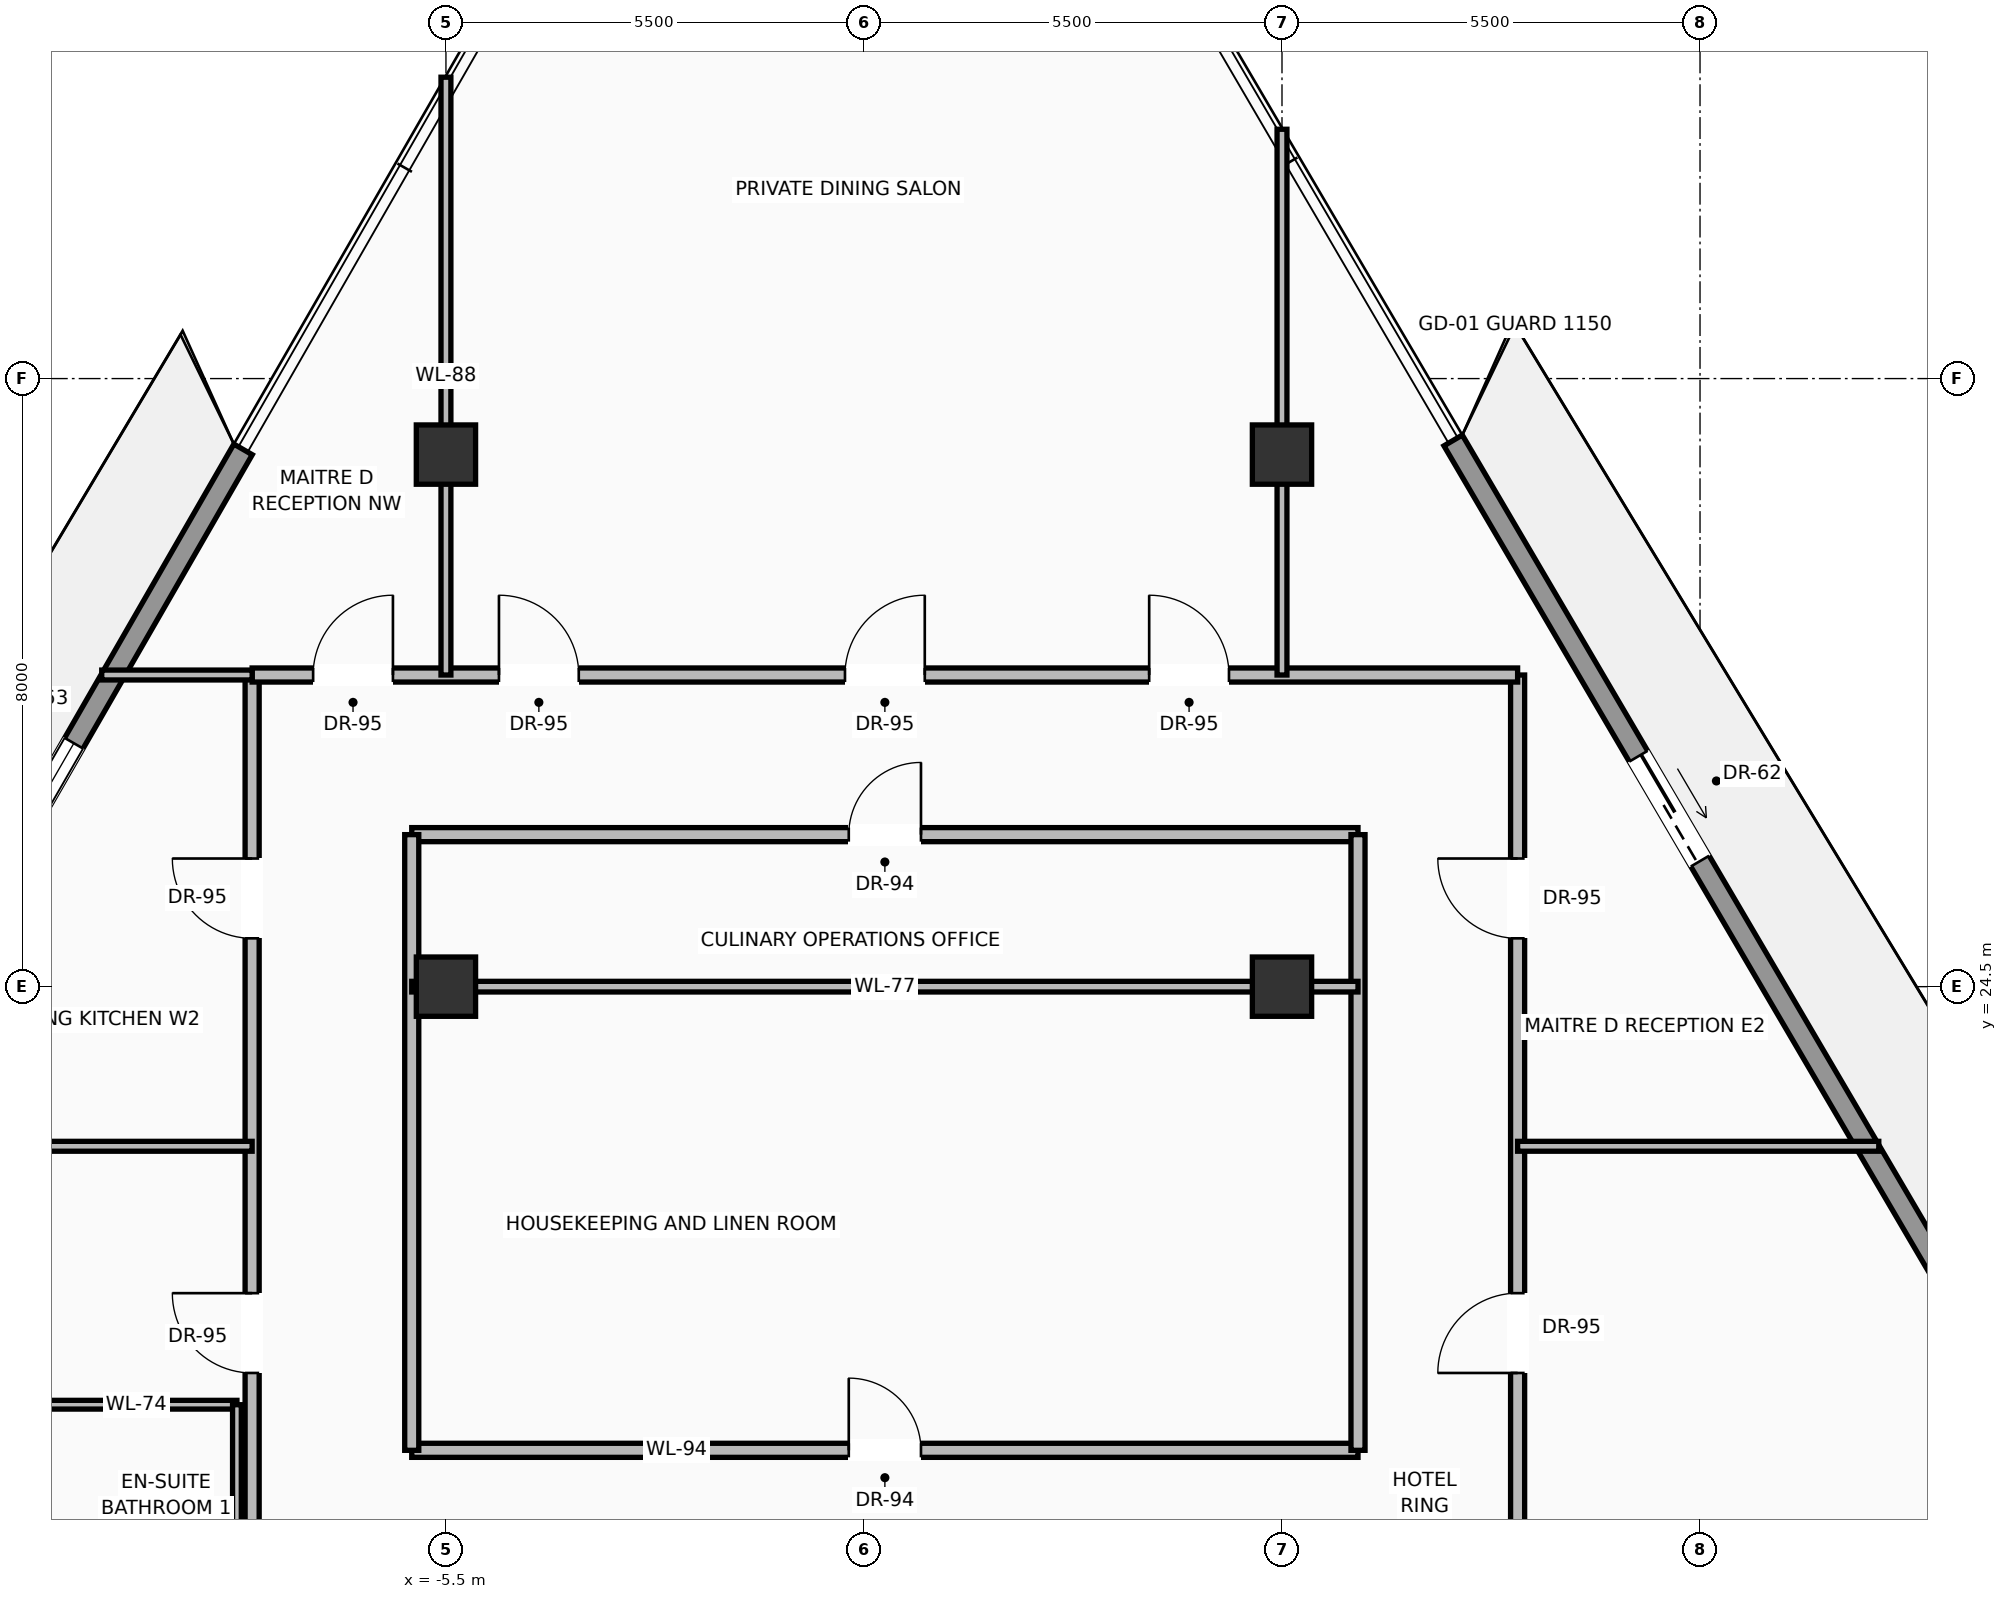
"""IFC4 building model, lengths in metres.
Left out: names, types, materials, properties, quantities, classifications, styles, units other than length and angle.
Written with IfcOpenShell. Run it as: python <this file> out.ifc"""

import sys

from ifc_helpers import new_model, si_unit, direction, frame, frame_2d, origin, origin_2d, place, context, subcontext, project, spatial, rectangle, extrude, source, transform, mapped, element, fill, save


model = new_model("IFC4")
c1 = context("Model", 3, precision=1e-05, world=origin(), true_north=direction((0.0, 1.0)))
c2 = subcontext(c1, "Body", "Model", "MODEL_VIEW")
j1 = project(units=[si_unit("LENGTHUNIT", "METRE"), si_unit("PLANEANGLEUNIT", "RADIAN")], contexts=[c1])
p1 = place(None, origin())
s1 = spatial("IfcSite", under=j1, at=p1, CompositionType="ELEMENT")
p2 = place(p1, origin())
s2 = spatial("IfcBuilding", under=s1, at=p2, CompositionType="ELEMENT")
p3 = place(p2, frame((0.0, 0.0, 283.35)))
s3 = spatial("IfcBuildingStorey", under=s2, at=p3, CompositionType="ELEMENT", Elevation=283.35)
m1 = source(origin(), c2, "Body", "SweptSolid", [
    extrude(rectangle(XDim=0.78, YDim=0.78, at=origin_2d()), origin(), (0.0, 0.0, 1.0), 3.45),
])
for number, where, z_axis, x_axis in (
    (1, (-5.5, 24.5, 0.0), (0.0, 0.0, 1.0), (1.0, 0.0, 0.0)),
    (2, (5.5, 24.5, 0.0), (0.0, 0.0, 1.0), (1.0, 0.0, 0.0)),
    (3, (-5.5, 31.5, 0.0), (0.0, 0.0, 1.0), (1.0, 0.0, 0.0)),
    (4, (5.5, 31.5, 0.0), (0.0, 0.0, 1.0), (1.0, 0.0, 0.0)),
):
    element("IfcColumn", number, at=place(p3, frame(where, z_axis=z_axis, x_axis=x_axis)), inside=s3, PredefinedType="COLUMN", context=c2, shape_type="MappedRepresentation", body=[
        mapped(m1, transform((0.0, 0.0, 0.0), scale=1.0)),
    ])
p4 = place(p3, frame((-18.245, 14.072, 0.0), z_axis=(0.0, 0.0, 1.0), x_axis=(0.499006273731, 0.866598372244, 0.0)))
e5 = element("IfcWall", 5, at=p4, inside=s3, PredefinedType="SOLIDWALL", context=c2, shape_type="SweptSolid", body=[
    extrude(rectangle(XDim=20.19, YDim=0.28, at=frame_2d((10.095, 0.0))), origin(), (0.0, 0.0, 1.0), 2.82),
])
p5 = place(p4, frame((4.846, 0.0, 0.0)))
e6 = element("IfcOpeningElement", 6, at=p5, cuts=e5, PredefinedType="OPENING", context=c2, shape_type="SweptSolid", body=[
    extrude(rectangle(XDim=1.6, YDim=2.35, at=frame_2d((0.8, 1.175))), frame((0.0, 0.15, 0.0), z_axis=(0.0, -1.0, 0.0), x_axis=(1.0, 0.0, 0.0)), (0.0, 0.0, 1.0), 0.3),
])
p6 = place(p4, frame((13.729, 0.0, 0.9)))
e7 = element("IfcOpeningElement", 7, at=p6, cuts=e5, PredefinedType="OPENING", context=c2, shape_type="SweptSolid", body=[
    extrude(rectangle(XDim=2.0, YDim=1.75, at=frame_2d((1.0, 0.875))), frame((0.0, 0.15, 0.0), z_axis=(0.0, -1.0, 0.0), x_axis=(1.0, 0.0, 0.0)), (0.0, 0.0, 1.0), 0.3),
])
p7 = place(p3, frame((7.752, 31.686, 0.0), z_axis=(0.0, 0.0, 1.0), x_axis=(0.506132125438, -0.862455953426, 0.0)))
e8 = element("IfcWall", 8, at=p7, inside=s3, PredefinedType="SOLIDWALL", context=c2, shape_type="SweptSolid", body=[
    extrude(rectangle(XDim=20.071, YDim=0.28, at=frame_2d((10.036, 0.0))), origin(), (0.0, 0.0, 1.0), 2.82),
])
p8 = place(p7, frame((4.817, 0.0, 0.0)))
e9 = element("IfcOpeningElement", 9, at=p8, cuts=e8, PredefinedType="OPENING", context=c2, shape_type="SweptSolid", body=[
    extrude(rectangle(XDim=1.6, YDim=2.35, at=frame_2d((0.8, 1.175))), frame((0.0, 0.15, 0.0), z_axis=(0.0, -1.0, 0.0), x_axis=(1.0, 0.0, 0.0)), (0.0, 0.0, 1.0), 0.3),
])
p9 = place(p7, frame((13.648, 0.0, 0.9)))
e10 = element("IfcOpeningElement", 10, at=p9, cuts=e8, PredefinedType="OPENING", context=c2, shape_type="SweptSolid", body=[
    extrude(rectangle(XDim=2.0, YDim=1.75, at=frame_2d((1.0, 0.875))), frame((0.0, 0.15, 0.0), z_axis=(0.0, -1.0, 0.0), x_axis=(1.0, 0.0, 0.0)), (0.0, 0.0, 1.0), 0.3),
])
p10 = place(p3, frame((-5.95, 18.4, 0.0), z_axis=(0.0, 0.0, 1.0), x_axis=(1.0, 0.0, 0.0)))
e11 = element("IfcWall", 11, at=p10, inside=s3, PredefinedType="PARTITIONING", context=c2, shape_type="SweptSolid", body=[
    extrude(rectangle(XDim=12.45, YDim=0.185, at=frame_2d((6.225, 0.0))), origin(), (0.0, 0.0, 1.0), 3.232),
])
p11 = place(p10, frame((5.75, 0.0, 0.0)))
e12 = element("IfcOpeningElement", 12, at=p11, cuts=e11, PredefinedType="OPENING", context=c2, shape_type="SweptSolid", body=[
    extrude(rectangle(XDim=0.95, YDim=2.2, at=frame_2d((0.475, 1.1))), frame((0.0, 0.103, 0.0), z_axis=(0.0, -1.0, 0.0), x_axis=(1.0, 0.0, 0.0)), (0.0, 0.0, 1.0), 0.205),
])
p12 = place(p3, frame((-5.95, 26.5, 0.0), z_axis=(0.0, 0.0, 1.0), x_axis=(1.0, 0.0, 0.0)))
e13 = element("IfcWall", 13, at=p12, inside=s3, PredefinedType="PARTITIONING", context=c2, shape_type="SweptSolid", body=[
    extrude(rectangle(XDim=12.45, YDim=0.185, at=frame_2d((6.225, 0.0))), origin(), (0.0, 0.0, 1.0), 3.232),
])
p13 = place(p12, frame((5.75, 0.0, 0.0)))
e14 = element("IfcOpeningElement", 14, at=p13, cuts=e13, PredefinedType="OPENING", context=c2, shape_type="SweptSolid", body=[
    extrude(rectangle(XDim=0.95, YDim=2.2, at=frame_2d((0.475, 1.1))), frame((0.0, 0.103, 0.0), z_axis=(0.0, -1.0, 0.0), x_axis=(1.0, 0.0, 0.0)), (0.0, 0.0, 1.0), 0.205),
])
for number, where, z_axis, x_axis in (
    (15, (-5.95, 18.4, 0.0), (0.0, 0.0, 1.0), (0.0, 1.0, 0.0)),
    (16, (6.5, 18.4, 0.0), (0.0, 0.0, 1.0), (0.0, 1.0, 0.0)),
):
    element("IfcWall", number, at=place(p3, frame(where, z_axis=z_axis, x_axis=x_axis)), inside=s3, PredefinedType="PARTITIONING", context=c2, shape_type="SweptSolid", body=[
        extrude(rectangle(XDim=8.1, YDim=0.185, at=frame_2d((4.05, 0.0))), origin(), (0.0, 0.0, 1.0), 3.232),
    ])
p14 = place(p3, frame((-8.05, 16.2, 0.0), z_axis=(0.0, 0.0, 1.0), x_axis=(0.0, 1.0, 0.0)))
e17 = element("IfcWall", 17, at=p14, inside=s3, PredefinedType="PARTITIONING", context=c2, shape_type="SweptSolid", body=[
    extrude(rectangle(XDim=12.4, YDim=0.185, at=frame_2d((6.2, 0.0))), origin(), (0.0, 0.0, 1.0), 3.232),
])
p15 = place(p14, frame((3.218, 0.0, 0.0)))
e18 = element("IfcOpeningElement", 18, at=p15, cuts=e17, PredefinedType="OPENING", context=c2, shape_type="SweptSolid", body=[
    extrude(rectangle(XDim=1.05, YDim=2.25, at=frame_2d((0.525, 1.125))), frame((0.0, 0.103, 0.0), z_axis=(0.0, -1.0, 0.0), x_axis=(1.0, 0.0, 0.0)), (0.0, 0.0, 1.0), 0.205),
])
p16 = place(p14, frame((8.936, 0.0, 0.0)))
e19 = element("IfcOpeningElement", 19, at=p16, cuts=e17, PredefinedType="OPENING", context=c2, shape_type="SweptSolid", body=[
    extrude(rectangle(XDim=1.05, YDim=2.25, at=frame_2d((0.525, 1.125))), frame((0.0, 0.103, 0.0), z_axis=(0.0, -1.0, 0.0), x_axis=(1.0, 0.0, 0.0)), (0.0, 0.0, 1.0), 0.205),
])
p17 = place(p3, frame((8.6, 16.2, 0.0), z_axis=(0.0, 0.0, 1.0), x_axis=(0.0, 1.0, 0.0)))
e20 = element("IfcWall", 20, at=p17, inside=s3, PredefinedType="PARTITIONING", context=c2, shape_type="SweptSolid", body=[
    extrude(rectangle(XDim=12.4, YDim=0.185, at=frame_2d((6.2, 0.0))), origin(), (0.0, 0.0, 1.0), 3.232),
])
p18 = place(p17, frame((3.218, 0.0, 0.0)))
e21 = element("IfcOpeningElement", 21, at=p18, cuts=e20, PredefinedType="OPENING", context=c2, shape_type="SweptSolid", body=[
    extrude(rectangle(XDim=1.05, YDim=2.25, at=frame_2d((0.525, 1.125))), frame((0.0, 0.103, 0.0), z_axis=(0.0, -1.0, 0.0), x_axis=(1.0, 0.0, 0.0)), (0.0, 0.0, 1.0), 0.205),
])
p19 = place(p17, frame((8.936, 0.0, 0.0)))
e22 = element("IfcOpeningElement", 22, at=p19, cuts=e20, PredefinedType="OPENING", context=c2, shape_type="SweptSolid", body=[
    extrude(rectangle(XDim=1.05, YDim=2.25, at=frame_2d((0.525, 1.125))), frame((0.0, 0.103, 0.0), z_axis=(0.0, -1.0, 0.0), x_axis=(1.0, 0.0, 0.0)), (0.0, 0.0, 1.0), 0.205),
])
p20 = place(p3, frame((-8.05, 28.6, 0.0), z_axis=(0.0, 0.0, 1.0), x_axis=(1.0, 0.0, 0.0)))
e23 = element("IfcWall", 23, at=p20, inside=s3, PredefinedType="PARTITIONING", context=c2, shape_type="SweptSolid", body=[
    extrude(rectangle(XDim=16.65, YDim=0.185, at=frame_2d((8.325, 0.0))), origin(), (0.0, 0.0, 1.0), 3.232),
])
p21 = place(p20, frame((3.248, 0.0, 0.0)))
e24 = element("IfcOpeningElement", 24, at=p21, cuts=e23, PredefinedType="OPENING", context=c2, shape_type="SweptSolid", body=[
    extrude(rectangle(XDim=1.05, YDim=2.25, at=frame_2d((0.525, 1.125))), frame((0.0, 0.103, 0.0), z_axis=(0.0, -1.0, 0.0), x_axis=(1.0, 0.0, 0.0)), (0.0, 0.0, 1.0), 0.205),
])
p22 = place(p20, frame((7.8, 0.0, 0.0)))
e25 = element("IfcOpeningElement", 25, at=p22, cuts=e23, PredefinedType="OPENING", context=c2, shape_type="SweptSolid", body=[
    extrude(rectangle(XDim=1.05, YDim=2.25, at=frame_2d((0.525, 1.125))), frame((0.0, 0.103, 0.0), z_axis=(0.0, -1.0, 0.0), x_axis=(1.0, 0.0, 0.0)), (0.0, 0.0, 1.0), 0.205),
])
p23 = place(p20, frame((11.802, 0.0, 0.0)))
e26 = element("IfcOpeningElement", 26, at=p23, cuts=e23, PredefinedType="OPENING", context=c2, shape_type="SweptSolid", body=[
    extrude(rectangle(XDim=1.05, YDim=2.25, at=frame_2d((0.525, 1.125))), frame((0.0, 0.103, 0.0), z_axis=(0.0, -1.0, 0.0), x_axis=(1.0, 0.0, 0.0)), (0.0, 0.0, 1.0), 0.205),
])
p24 = place(p20, frame((0.802, 0.0, 0.0)))
e27 = element("IfcOpeningElement", 27, at=p24, cuts=e23, PredefinedType="OPENING", context=c2, shape_type="SweptSolid", body=[
    extrude(rectangle(XDim=1.05, YDim=2.25, at=frame_2d((0.525, 1.125))), frame((0.0, 0.103, 0.0), z_axis=(0.0, -1.0, 0.0), x_axis=(1.0, 0.0, 0.0)), (0.0, 0.0, 1.0), 0.205),
])
p25 = place(p3, frame((-5.95, 24.5, 0.0), z_axis=(0.0, 0.0, 1.0), x_axis=(1.0, 0.0, 0.0)))
e28 = element("IfcWall", 28, at=p25, inside=s3, PredefinedType="PARTITIONING", context=c2, shape_type="SweptSolid", body=[
    extrude(rectangle(XDim=12.45, YDim=0.14, at=frame_2d((6.225, 0.0))), origin(), (0.0, 0.0, 1.0), 2.683),
])
p26 = place(p3, frame((-10.029, 28.6, 0.0), z_axis=(0.0, 0.0, 1.0), x_axis=(1.0, 0.0, 0.0)))
e29 = element("IfcWall", 29, at=p26, inside=s3, PredefinedType="PARTITIONING", context=c2, shape_type="SweptSolid", body=[
    extrude(rectangle(XDim=1.979, YDim=0.13, at=frame_2d((0.989, 0.0))), origin(), (0.0, 0.0, 1.0), 3.232),
])
p27 = place(p3, frame((-5.5, 28.6, 0.0), z_axis=(0.0, 0.0, 1.0), x_axis=(0.0, 1.0, 0.0)))
e30 = element("IfcWall", 30, at=p27, inside=s3, PredefinedType="PARTITIONING", context=c2, shape_type="SweptSolid", body=[
    extrude(rectangle(XDim=7.865, YDim=0.13, at=frame_2d((3.932, 0.0))), origin(), (0.0, 0.0, 1.0), 2.683),
])
p28 = place(p3, frame((5.5, 28.6, 0.0), z_axis=(0.0, 0.0, 1.0), x_axis=(0.0, 1.0, 0.0)))
e31 = element("IfcWall", 31, at=p28, inside=s3, PredefinedType="PARTITIONING", context=c2, shape_type="SweptSolid", body=[
    extrude(rectangle(XDim=7.18, YDim=0.13, at=frame_2d((3.59, 0.0))), origin(), (0.0, 0.0, 1.0), 2.683),
])
p29 = place(p3, frame((-10.9, 19.0, 0.0), z_axis=(0.0, 0.0, 1.0), x_axis=(1.0, 0.0, 0.0)))
e32 = element("IfcWall", 32, at=p29, inside=s3, PredefinedType="PARTITIONING", context=c2, shape_type="SweptSolid", body=[
    extrude(rectangle(XDim=2.65, YDim=0.115, at=frame_2d((1.325, 0.0))), origin(), (0.0, 0.0, 1.0), 3.232),
])
p30 = place(p3, frame((-8.25, 16.6, 0.0), z_axis=(0.0, 0.0, 1.0), x_axis=(0.0, 1.0, 0.0)))
e33 = element("IfcWall", 33, at=p30, inside=s3, PredefinedType="PARTITIONING", context=c2, shape_type="SweptSolid", body=[
    extrude(rectangle(XDim=2.4, YDim=0.115, at=frame_2d((1.2, 0.0))), origin(), (0.0, 0.0, 1.0), 3.232),
])
p31 = place(p3, frame((-13.599, 22.4, 0.0), z_axis=(0.0, 0.0, 1.0), x_axis=(1.0, 0.0, 0.0)))
e34 = element("IfcWall", 34, at=p31, inside=s3, PredefinedType="PARTITIONING", context=c2, shape_type="SweptSolid", body=[
    extrude(rectangle(XDim=5.549, YDim=0.13, at=frame_2d((2.774, 0.0))), origin(), (0.0, 0.0, 1.0), 3.232),
])
p32 = place(p3, frame((8.6, 22.4, 0.0), z_axis=(0.0, 0.0, 1.0), x_axis=(1.0, 0.0, 0.0)))
e35 = element("IfcWall", 35, at=p32, inside=s3, PredefinedType="PARTITIONING", context=c2, shape_type="SweptSolid", body=[
    extrude(rectangle(XDim=4.752, YDim=0.13, at=frame_2d((2.376, 0.0))), origin(), (0.0, 0.0, 1.0), 3.232),
])
m2 = source(origin(), c2, "Body", "SweptSolid", [
    extrude(rectangle(XDim=2.0, YDim=1.75, at=frame_2d((1.0, 0.875))), frame((0.0, 0.03, 0.0), z_axis=(0.0, -1.0, 0.0), x_axis=(1.0, 0.0, 0.0)), (0.0, 0.0, 1.0), 0.06),
])
p33 = place(p6, origin())
e36 = element("IfcWindow", 36, at=p33, inside=s3, PartitioningType="SINGLE_PANEL", PredefinedType="WINDOW", context=c2, shape_type="MappedRepresentation", body=[
    mapped(m2, transform((0.0, 0.0, 0.0), scale=1.0)),
])
fill(e7, e36)
m3 = source(origin(), c2, "Body", "SweptSolid", [
    extrude(rectangle(XDim=1.6, YDim=2.35, at=frame_2d((0.8, 1.175))), frame((0.0, 0.025, 0.0), z_axis=(0.0, -1.0, 0.0), x_axis=(1.0, 0.0, 0.0)), (0.0, 0.0, 1.0), 0.05),
])
p34 = place(p8, origin())
e37 = element("IfcDoor", 37, at=p34, inside=s3, OperationType="SLIDING_TO_RIGHT", PredefinedType="DOOR", context=c2, shape_type="MappedRepresentation", body=[
    mapped(m3, transform((0.0, 0.0, 0.0), scale=1.0)),
])
fill(e9, e37)
m4 = source(origin(), c2, "Body", "SweptSolid", [
    extrude(rectangle(XDim=0.95, YDim=2.2, at=frame_2d((0.475, 1.1))), frame((0.0, 0.025, 0.0), z_axis=(0.0, -1.0, 0.0), x_axis=(1.0, 0.0, 0.0)), (0.0, 0.0, 1.0), 0.05),
])
p35 = place(p11, origin())
e38 = element("IfcDoor", 38, at=p35, inside=s3, OperationType="SINGLE_SWING_LEFT", PredefinedType="DOOR", context=c2, shape_type="MappedRepresentation", body=[
    mapped(m4, transform((0.0, 0.0, 0.0), scale=1.0)),
])
fill(e12, e38)
p36 = place(p13, origin())
e39 = element("IfcDoor", 39, at=p36, inside=s3, OperationType="SINGLE_SWING_RIGHT", PredefinedType="DOOR", context=c2, shape_type="MappedRepresentation", body=[
    mapped(m4, transform((0.0, 0.0, 0.0), scale=1.0)),
])
fill(e14, e39)
m5 = source(origin(), c2, "Body", "SweptSolid", [
    extrude(rectangle(XDim=1.05, YDim=2.25, at=frame_2d((0.525, 1.125))), frame((0.0, 0.025, 0.0), z_axis=(0.0, -1.0, 0.0), x_axis=(1.0, 0.0, 0.0)), (0.0, 0.0, 1.0), 0.05),
])
p37 = place(p15, origin())
e40 = element("IfcDoor", 40, at=p37, inside=s3, OperationType="SINGLE_SWING_RIGHT", PredefinedType="DOOR", context=c2, shape_type="MappedRepresentation", body=[
    mapped(m5, transform((0.0, 0.0, 0.0), scale=1.0)),
])
fill(e18, e40)
p38 = place(p16, origin())
e41 = element("IfcDoor", 41, at=p38, inside=s3, OperationType="SINGLE_SWING_RIGHT", PredefinedType="DOOR", context=c2, shape_type="MappedRepresentation", body=[
    mapped(m5, transform((0.0, 0.0, 0.0), scale=1.0)),
])
fill(e19, e41)
p39 = place(p18, origin())
e42 = element("IfcDoor", 42, at=p39, inside=s3, OperationType="SINGLE_SWING_LEFT", PredefinedType="DOOR", context=c2, shape_type="MappedRepresentation", body=[
    mapped(m5, transform((0.0, 0.0, 0.0), scale=1.0)),
])
fill(e21, e42)
p40 = place(p19, origin())
e43 = element("IfcDoor", 43, at=p40, inside=s3, OperationType="SINGLE_SWING_RIGHT", PredefinedType="DOOR", context=c2, shape_type="MappedRepresentation", body=[
    mapped(m5, transform((0.0, 0.0, 0.0), scale=1.0)),
])
fill(e22, e43)
p41 = place(p21, origin())
e44 = element("IfcDoor", 44, at=p41, inside=s3, OperationType="SINGLE_SWING_LEFT", PredefinedType="DOOR", context=c2, shape_type="MappedRepresentation", body=[
    mapped(m5, transform((0.0, 0.0, 0.0), scale=1.0)),
])
fill(e24, e44)
p42 = place(p22, origin())
e45 = element("IfcDoor", 45, at=p42, inside=s3, OperationType="SINGLE_SWING_RIGHT", PredefinedType="DOOR", context=c2, shape_type="MappedRepresentation", body=[
    mapped(m5, transform((0.0, 0.0, 0.0), scale=1.0)),
])
fill(e25, e45)
p43 = place(p23, origin())
e46 = element("IfcDoor", 46, at=p43, inside=s3, OperationType="SINGLE_SWING_LEFT", PredefinedType="DOOR", context=c2, shape_type="MappedRepresentation", body=[
    mapped(m5, transform((0.0, 0.0, 0.0), scale=1.0)),
])
fill(e26, e46)
p44 = place(p24, origin())
e47 = element("IfcDoor", 47, at=p44, inside=s3, OperationType="SINGLE_SWING_RIGHT", PredefinedType="DOOR", context=c2, shape_type="MappedRepresentation", body=[
    mapped(m5, transform((0.0, 0.0, 0.0), scale=1.0)),
])
fill(e27, e47)
save(model, sys.argv[1])
